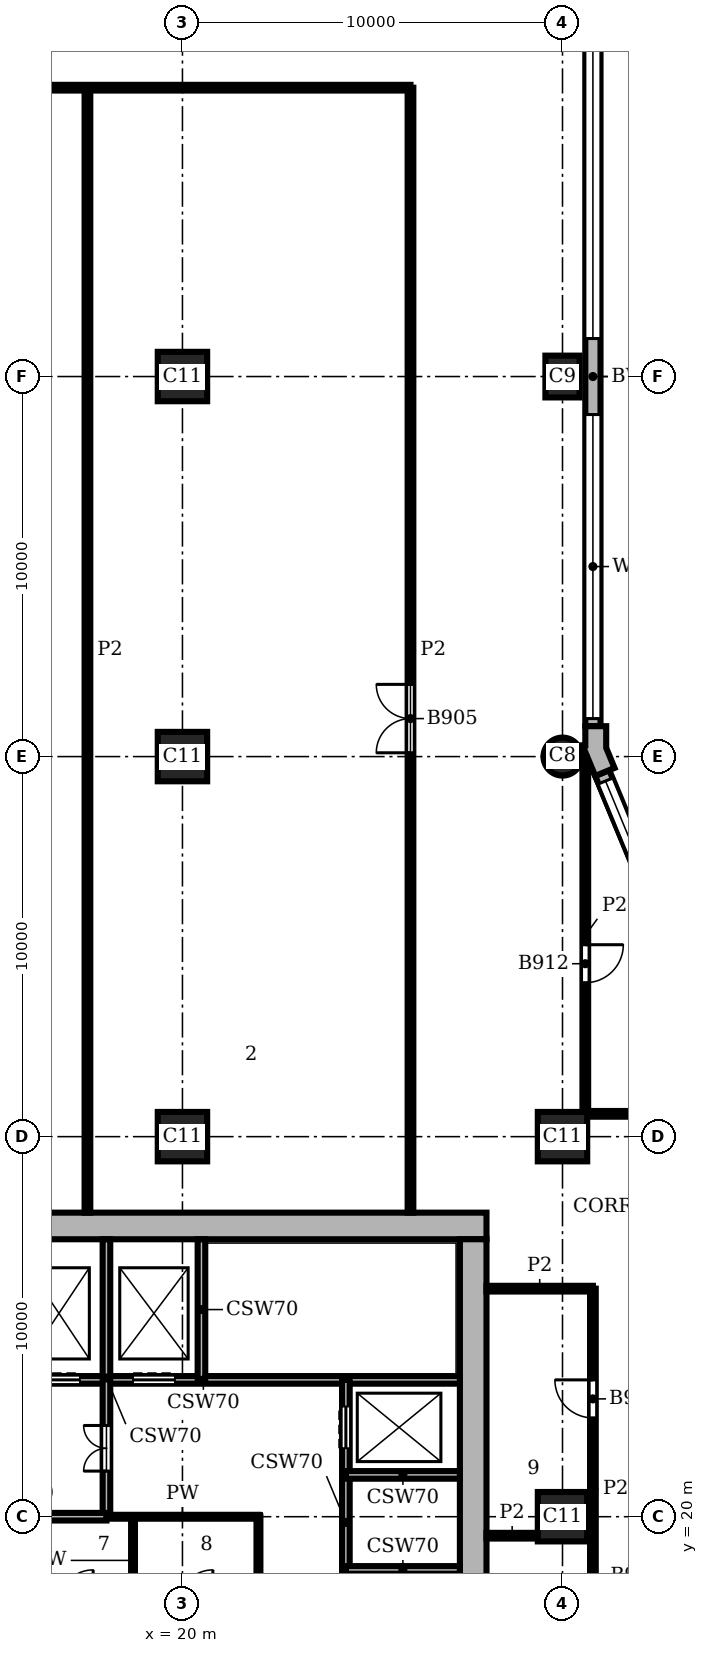
"""IFC4 building model, lengths in metres.
Left out: names, types, materials, properties, quantities, classifications, styles, units other than length and angle.
Written with IfcOpenShell. Run it as: python <this file> out.ifc"""

import sys

from ifc_helpers import new_model, si_unit, direction, frame, frame_2d, origin, origin_2d, place, context, subcontext, project, spatial, polyline, rectangle, circle, outline, extrude, element, fill, save


model = new_model("IFC4")
c1 = context("Model", 3, precision=1e-05, world=origin(), true_north=direction((0.0, 1.0)))
c2 = subcontext(c1, "Body", "Model", "MODEL_VIEW")
j1 = project(units=[si_unit("LENGTHUNIT", "METRE"), si_unit("PLANEANGLEUNIT", "RADIAN")], contexts=[c1])
p1 = place(None, origin())
s1 = spatial("IfcSite", under=j1, at=p1, CompositionType="ELEMENT")
p2 = place(p1, origin())
s2 = spatial("IfcBuilding", under=s1, at=p2, CompositionType="ELEMENT")
p3 = place(p2, frame((0.0, 0.0, 233.1)))
s3 = spatial("IfcBuildingStorey", under=s2, at=p3, CompositionType="ELEMENT", Elevation=233.1)
p4 = place(p3, frame((30.0, 40.0, 0.0), z_axis=(0.0, 0.0, 1.0), x_axis=(1.0, 0.0, 0.0)))
e1 = element("IfcColumn", 1, at=p4, inside=s3, PredefinedType="COLUMN", context=c2, shape_type="SweptSolid", body=[
    extrude(circle(Radius=0.5, at=origin_2d()), origin(), (0.0, 0.0, 1.0), 3.9),
])
p5 = place(p3, frame((30.0, 50.0, 0.0), z_axis=(0.0, 0.0, 1.0), x_axis=(0.0, 1.0, 0.0)))
e2 = element("IfcColumn", 2, at=p5, inside=s3, PredefinedType="COLUMN", context=c2, shape_type="SweptSolid", body=[
    extrude(rectangle(XDim=1.1, YDim=0.9, at=origin_2d()), origin(), (0.0, 0.0, 1.0), 3.9),
])
for number, where, z_axis, x_axis in (
    (3, (20.0, 30.0, 0.0), (0.0, 0.0, 1.0), (1.0, 0.0, 0.0)),
    (4, (20.0, 40.0, 0.0), (0.0, 0.0, 1.0), (1.0, 0.0, 0.0)),
    (5, (20.0, 50.0, 0.0), (0.0, 0.0, 1.0), (1.0, 0.0, 0.0)),
    (6, (30.0, 20.0, 0.0), (0.0, 0.0, 1.0), (1.0, 0.0, 0.0)),
    (7, (30.0, 30.0, 0.0), (0.0, 0.0, 1.0), (1.0, 0.0, 0.0)),
):
    element("IfcColumn", number, at=place(p3, frame(where, z_axis=z_axis, x_axis=x_axis)), inside=s3, PredefinedType="COLUMN", context=c2, shape_type="SweptSolid", body=[
        extrude(rectangle(XDim=1.3, YDim=1.3, at=origin_2d()), origin(), (0.0, 0.0, 1.0), 3.9),
    ])
p6 = place(p3, frame((27.65, 8.7, 0.0), z_axis=(0.0, 0.0, 1.0), x_axis=(0.0, 1.0, 0.0)))
e8 = element("IfcWall", 8, at=p6, inside=s3, PredefinedType="SHEAR", context=c2, shape_type="SweptSolid", body=[
    extrude(rectangle(XDim=18.6, YDim=0.7, at=frame_2d((9.3, 0.0))), origin(), (0.0, 0.0, 1.0), 3.9),
])
p7 = place(p6, frame((4.75, 0.0, 0.0)))
e9 = element("IfcOpeningElement", 9, at=p7, cuts=e8, PredefinedType="OPENING", context=c2, shape_type="SweptSolid", body=[
    extrude(rectangle(XDim=1.6, YDim=2.1, at=frame_2d((0.8, 1.05))), frame((0.0, 0.36, 0.0), z_axis=(0.0, -1.0, 0.0), x_axis=(1.0, 0.0, 0.0)), (0.0, 0.0, 1.0), 0.72),
])
p8 = place(p3, frame((28.0, 27.65, 0.0), z_axis=(0.0, 0.0, 1.0), x_axis=(-1.0, 0.0, 0.0)))
e10 = element("IfcWall", 10, at=p8, inside=s3, PredefinedType="SHEAR", context=c2, shape_type="SweptSolid", body=[
    extrude(rectangle(XDim=20.0, YDim=0.7, at=frame_2d((10.0, 0.0))), origin(), (0.0, 0.0, 1.0), 3.9),
])
p9 = place(p3, origin())
e11 = element("IfcWall", 11, at=p9, inside=s3, PredefinedType="SOLIDWALL", context=c2, shape_type="SweptSolid", body=[
    extrude(outline(polyline([(30.62, 39.995), (30.62, 40.071), (30.861, 39.49), (31.23, 39.644), (31.369, 39.701), (31.15, 40.229), (31.15, 40.8), (31.0, 40.8), (30.6, 40.8), (30.6, 40.295), (30.5, 40.295), (30.5, 39.995), (30.62, 39.995)])), origin(), (0.0, 0.0, 1.0), 3.9),
])
p10 = place(p3, frame((33.362, 33.974, 0.0), z_axis=(0.0, 0.0, 1.0), x_axis=(-0.382655745237, 0.923891000409, 0.0)))
e12 = element("IfcWall", 12, at=p10, inside=s3, PredefinedType="SOLIDWALL", context=c2, shape_type="SweptSolid", body=[
    extrude(rectangle(XDim=6.053, YDim=0.4, at=frame_2d((3.027, 0.0))), origin(), (0.0, 0.0, 1.0), 3.9),
])
p11 = place(p10, frame((0.227, 0.0, 0.9)))
e13 = element("IfcOpeningElement", 13, at=p11, cuts=e12, PredefinedType="OPENING", context=c2, shape_type="SweptSolid", body=[
    extrude(rectangle(XDim=5.6, YDim=2.35, at=frame_2d((2.8, 1.175))), frame((0.0, 0.21, 0.0), z_axis=(0.0, -1.0, 0.0), x_axis=(1.0, 0.0, 0.0)), (0.0, 0.0, 1.0), 0.42),
])
p12 = place(p3, frame((30.8, 40.8, 0.0), z_axis=(0.0, 0.0, 1.0), x_axis=(0.0, 1.0, 0.0)))
e14 = element("IfcWall", 14, at=p12, inside=s3, PredefinedType="SOLIDWALL", context=c2, shape_type="SweptSolid", body=[
    extrude(rectangle(XDim=18.4, YDim=0.4, at=frame_2d((9.2, 0.0))), origin(), (0.0, 0.0, 1.0), 3.9),
])
p13 = place(p12, frame((0.2, 0.0, 0.9)))
e15 = element("IfcOpeningElement", 15, at=p13, cuts=e14, PredefinedType="OPENING", context=c2, shape_type="SweptSolid", body=[
    extrude(rectangle(XDim=8.0, YDim=2.35, at=frame_2d((4.0, 1.175))), frame((0.0, 0.21, 0.0), z_axis=(0.0, -1.0, 0.0), x_axis=(1.0, 0.0, 0.0)), (0.0, 0.0, 1.0), 0.42),
])
p14 = place(p12, frame((10.2, 0.0, 0.9)))
e16 = element("IfcOpeningElement", 16, at=p14, cuts=e14, PredefinedType="OPENING", context=c2, shape_type="SweptSolid", body=[
    extrude(rectangle(XDim=8.0, YDim=2.35, at=frame_2d((4.0, 1.175))), frame((0.0, 0.21, 0.0), z_axis=(0.0, -1.0, 0.0), x_axis=(1.0, 0.0, 0.0)), (0.0, 0.0, 1.0), 0.42),
])
p15 = place(p3, frame((24.3, 18.6, 0.0), z_axis=(0.0, 0.0, 1.0), x_axis=(1.0, 0.0, 0.0)))
e17 = element("IfcWall", 17, at=p15, inside=s3, PredefinedType="SHEAR", context=c2, shape_type="SweptSolid", body=[
    extrude(rectangle(XDim=3.0, YDim=0.2, at=frame_2d((1.5, 0.0))), origin(), (0.0, 0.0, 1.0), 3.45),
])
p16 = place(p3, frame((18.0, 20.0, 0.0), z_axis=(0.0, 0.0, 1.0), x_axis=(1.0, 0.0, 0.0)))
e18 = element("IfcWall", 18, at=p16, inside=s3, PredefinedType="PARTITIONING", context=c2, shape_type="SweptSolid", body=[
    extrude(rectangle(XDim=4.0, YDim=0.1, at=frame_2d((2.0, 0.0))), origin(), (0.0, 0.0, 1.0), 3.45),
])
p17 = place(p3, frame((13.3, 20.0, 0.0), z_axis=(0.0, 0.0, 1.0), x_axis=(1.0, 0.0, 0.0)))
e19 = element("IfcWall", 19, at=p17, inside=s3, PredefinedType="SHEAR", context=c2, shape_type="SweptSolid", body=[
    extrude(rectangle(XDim=4.7, YDim=0.2, at=frame_2d((2.35, 0.0))), origin(), (0.0, 0.0, 1.0), 3.45),
])
p18 = place(p3, frame((24.3, 21.1, 0.0), z_axis=(0.0, 0.0, 1.0), x_axis=(1.0, 0.0, 0.0)))
e20 = element("IfcWall", 20, at=p18, inside=s3, PredefinedType="SHEAR", context=c2, shape_type="SweptSolid", body=[
    extrude(rectangle(XDim=3.0, YDim=0.2, at=frame_2d((1.5, 0.0))), origin(), (0.0, 0.0, 1.0), 3.45),
])
p19 = place(p3, frame((13.8, 23.6, 0.0), z_axis=(0.0, 0.0, 1.0), x_axis=(1.0, 0.0, 0.0)))
e21 = element("IfcWall", 21, at=p19, inside=s3, PredefinedType="SHEAR", context=c2, shape_type="SweptSolid", body=[
    extrude(rectangle(XDim=13.5, YDim=0.2, at=frame_2d((6.75, 0.0))), origin(), (0.0, 0.0, 1.0), 3.45),
])
p20 = place(p19, frame((2.4, 0.0, 0.0)))
e22 = element("IfcOpeningElement", 22, at=p20, cuts=e21, PredefinedType="OPENING", context=c2, shape_type="SweptSolid", body=[
    extrude(rectangle(XDim=1.1, YDim=2.1, at=frame_2d((0.55, 1.05))), frame((0.0, 0.11, 0.0), z_axis=(0.0, -1.0, 0.0), x_axis=(1.0, 0.0, 0.0)), (0.0, 0.0, 1.0), 0.22),
])
p21 = place(p19, frame((4.9, 0.0, 0.0)))
e23 = element("IfcOpeningElement", 23, at=p21, cuts=e21, PredefinedType="OPENING", context=c2, shape_type="SweptSolid", body=[
    extrude(rectangle(XDim=1.1, YDim=2.1, at=frame_2d((0.55, 1.05))), frame((0.0, 0.11, 0.0), z_axis=(0.0, -1.0, 0.0), x_axis=(1.0, 0.0, 0.0)), (0.0, 0.0, 1.0), 0.22),
])
p22 = place(p19, frame((0.2, 0.0, 0.0)))
e24 = element("IfcOpeningElement", 24, at=p22, cuts=e21, PredefinedType="OPENING", context=c2, shape_type="SweptSolid", body=[
    extrude(rectangle(XDim=1.0, YDim=2.1, at=frame_2d((0.5, 1.05))), frame((0.0, 0.11, 0.0), z_axis=(0.0, -1.0, 0.0), x_axis=(1.0, 0.0, 0.0)), (0.0, 0.0, 1.0), 0.22),
])
p23 = place(p3, frame((18.0, 20.0, 0.0), z_axis=(0.0, 0.0, 1.0), x_axis=(0.0, 1.0, 0.0)))
e25 = element("IfcWall", 25, at=p23, inside=s3, PredefinedType="SHEAR", context=c2, shape_type="SweptSolid", body=[
    extrude(rectangle(XDim=7.3, YDim=0.2, at=frame_2d((3.65, 0.0))), origin(), (0.0, 0.0, 1.0), 3.45),
])
p24 = place(p23, frame((1.2, 0.0, 0.0)))
e26 = element("IfcOpeningElement", 26, at=p24, cuts=e25, PredefinedType="OPENING", context=c2, shape_type="SweptSolid", body=[
    extrude(rectangle(XDim=1.2, YDim=2.1, at=frame_2d((0.6, 1.05))), frame((0.0, 0.11, 0.0), z_axis=(0.0, -1.0, 0.0), x_axis=(1.0, 0.0, 0.0)), (0.0, 0.0, 1.0), 0.22),
])
p25 = place(p3, frame((18.7, 17.7, 0.0), z_axis=(0.0, 0.0, 1.0), x_axis=(0.0, 1.0, 0.0)))
e27 = element("IfcWall", 27, at=p25, inside=s3, PredefinedType="PARTITIONING", context=c2, shape_type="SweptSolid", body=[
    extrude(rectangle(XDim=2.3, YDim=0.1, at=frame_2d((1.15, 0.0))), origin(), (0.0, 0.0, 1.0), 3.45),
])
p26 = place(p3, frame((20.5, 23.6, 0.0), z_axis=(0.0, 0.0, 1.0), x_axis=(0.0, 1.0, 0.0)))
e28 = element("IfcWall", 28, at=p26, inside=s3, PredefinedType="SHEAR", context=c2, shape_type="SweptSolid", body=[
    extrude(rectangle(XDim=3.7, YDim=0.2, at=frame_2d((1.85, 0.0))), origin(), (0.0, 0.0, 1.0), 3.45),
])
p27 = place(p3, frame((22.0, 16.2, 0.0), z_axis=(0.0, 0.0, 1.0), x_axis=(0.0, 1.0, 0.0)))
e29 = element("IfcWall", 29, at=p27, inside=s3, PredefinedType="PARTITIONING", context=c2, shape_type="SweptSolid", body=[
    extrude(rectangle(XDim=3.8, YDim=0.1, at=frame_2d((1.9, 0.0))), origin(), (0.0, 0.0, 1.0), 3.45),
])
p28 = place(p27, frame((0.2, 0.0, 0.0)))
e30 = element("IfcOpeningElement", 30, at=p28, cuts=e29, PredefinedType="OPENING", context=c2, shape_type="SweptSolid", body=[
    extrude(rectangle(XDim=1.1, YDim=2.1, at=frame_2d((0.55, 1.05))), frame((0.0, 0.06, 0.0), z_axis=(0.0, -1.0, 0.0), x_axis=(1.0, 0.0, 0.0)), (0.0, 0.0, 1.0), 0.12),
])
p29 = place(p3, frame((24.3, 16.1, 0.0), z_axis=(0.0, 0.0, 1.0), x_axis=(0.0, 1.0, 0.0)))
e31 = element("IfcWall", 31, at=p29, inside=s3, PredefinedType="SHEAR", context=c2, shape_type="SweptSolid", body=[
    extrude(rectangle(XDim=7.5, YDim=0.2, at=frame_2d((3.75, 0.0))), origin(), (0.0, 0.0, 1.0), 3.45),
])
p30 = place(p29, frame((5.7, 0.0, 0.0)))
e32 = element("IfcOpeningElement", 32, at=p30, cuts=e31, PredefinedType="OPENING", context=c2, shape_type="SweptSolid", body=[
    extrude(rectangle(XDim=1.1, YDim=2.1, at=frame_2d((0.55, 1.05))), frame((0.0, 0.11, 0.0), z_axis=(0.0, -1.0, 0.0), x_axis=(1.0, 0.0, 0.0)), (0.0, 0.0, 1.0), 0.22),
])
p31 = place(p3, frame((17.5, 28.0, 0.0), z_axis=(0.0, 0.0, 1.0), x_axis=(0.0, 1.0, 0.0)))
e33 = element("IfcWall", 33, at=p31, inside=s3, PredefinedType="PARTITIONING", context=c2, shape_type="SweptSolid", body=[
    extrude(rectangle(XDim=29.6, YDim=0.15, at=frame_2d((14.8, 0.0))), origin(), (0.0, 0.0, 1.0), 3.45),
])
p32 = place(p3, frame((26.0, 28.0, 0.0), z_axis=(0.0, 0.0, 1.0), x_axis=(0.0, 1.0, 0.0)))
e34 = element("IfcWall", 34, at=p32, inside=s3, PredefinedType="PARTITIONING", context=c2, shape_type="SweptSolid", body=[
    extrude(rectangle(XDim=29.6, YDim=0.15, at=frame_2d((14.8, 0.0))), origin(), (0.0, 0.0, 1.0), 3.45),
])
p33 = place(p32, frame((12.1, 0.0, 0.0)))
e35 = element("IfcOpeningElement", 35, at=p33, cuts=e34, PredefinedType="OPENING", context=c2, shape_type="SweptSolid", body=[
    extrude(rectangle(XDim=1.8, YDim=2.1, at=frame_2d((0.9, 1.05))), frame((0.0, 0.085, 0.0), z_axis=(0.0, -1.0, 0.0), x_axis=(1.0, 0.0, 0.0)), (0.0, 0.0, 1.0), 0.17),
])
p34 = place(p3, frame((30.6, 30.65, 0.0), z_axis=(0.0, 0.0, 1.0), x_axis=(0.0, 1.0, 0.0)))
e36 = element("IfcWall", 36, at=p34, inside=s3, PredefinedType="PARTITIONING", context=c2, shape_type="SweptSolid", body=[
    extrude(rectangle(XDim=9.288, YDim=0.15, at=frame_2d((4.644, 0.0))), origin(), (0.0, 0.0, 1.0), 3.45),
])
p35 = place(p34, frame((3.4, 0.0, 0.0)))
e37 = element("IfcOpeningElement", 37, at=p35, cuts=e36, PredefinedType="OPENING", context=c2, shape_type="SweptSolid", body=[
    extrude(rectangle(XDim=1.0, YDim=2.1, at=frame_2d((0.5, 1.05))), frame((0.0, 0.085, 0.0), z_axis=(0.0, -1.0, 0.0), x_axis=(1.0, 0.0, 0.0)), (0.0, 0.0, 1.0), 0.17),
])
p36 = place(p3, frame((30.8, 15.45, 0.0), z_axis=(0.0, 0.0, 1.0), x_axis=(0.0, 1.0, 0.0)))
e38 = element("IfcWall", 38, at=p36, inside=s3, PredefinedType="PARTITIONING", context=c2, shape_type="SweptSolid", body=[
    extrude(rectangle(XDim=10.55, YDim=0.15, at=frame_2d((5.275, 0.0))), origin(), (0.0, 0.0, 1.0), 3.45),
])
p37 = place(p36, frame((7.15, 0.0, 0.0)))
e39 = element("IfcOpeningElement", 39, at=p37, cuts=e38, PredefinedType="OPENING", context=c2, shape_type="SweptSolid", body=[
    extrude(rectangle(XDim=1.0, YDim=2.1, at=frame_2d((0.5, 1.05))), frame((0.0, 0.085, 0.0), z_axis=(0.0, -1.0, 0.0), x_axis=(1.0, 0.0, 0.0)), (0.0, 0.0, 1.0), 0.17),
])
p38 = place(p36, frame((1.35, 0.0, 0.0)))
e40 = element("IfcOpeningElement", 40, at=p38, cuts=e38, PredefinedType="OPENING", context=c2, shape_type="SweptSolid", body=[
    extrude(rectangle(XDim=1.0, YDim=2.1, at=frame_2d((0.5, 1.05))), frame((0.0, 0.085, 0.0), z_axis=(0.0, -1.0, 0.0), x_axis=(1.0, 0.0, 0.0)), (0.0, 0.0, 1.0), 0.17),
])
p39 = place(p3, frame((28.0, 19.5, 0.0), z_axis=(0.0, 0.0, 1.0), x_axis=(1.0, 0.0, 0.0)))
e41 = element("IfcWall", 41, at=p39, inside=s3, PredefinedType="PARTITIONING", context=c2, shape_type="SweptSolid", body=[
    extrude(rectangle(XDim=1.35, YDim=0.15, at=frame_2d((0.675, 0.0))), origin(), (0.0, 0.0, 1.0), 3.45),
])
p40 = place(p3, frame((28.0, 26.0, 0.0), z_axis=(0.0, 0.0, 1.0), x_axis=(1.0, 0.0, 0.0)))
e42 = element("IfcWall", 42, at=p40, inside=s3, PredefinedType="PARTITIONING", context=c2, shape_type="SweptSolid", body=[
    extrude(rectangle(XDim=2.8, YDim=0.15, at=frame_2d((1.4, 0.0))), origin(), (0.0, 0.0, 1.0), 3.45),
])
p41 = place(p3, frame((30.65, 30.6, 0.0), z_axis=(0.0, 0.0, 1.0), x_axis=(1.0, 0.0, 0.0)))
e43 = element("IfcWall", 43, at=p41, inside=s3, PredefinedType="PARTITIONING", context=c2, shape_type="SweptSolid", body=[
    extrude(rectangle(XDim=9.288, YDim=0.15, at=frame_2d((4.644, 0.0))), origin(), (0.0, 0.0, 1.0), 3.45),
])
p42 = place(p3, frame((5.5, 57.6, 0.0), z_axis=(0.0, 0.0, 1.0), x_axis=(1.0, 0.0, 0.0)))
e44 = element("IfcWall", 44, at=p42, inside=s3, PredefinedType="PARTITIONING", context=c2, shape_type="SweptSolid", body=[
    extrude(rectangle(XDim=20.5, YDim=0.15, at=frame_2d((10.25, 0.0))), origin(), (0.0, 0.0, 1.0), 3.45),
])
p43 = place(p42, frame((8.1, 0.0, 0.0)))
e45 = element("IfcOpeningElement", 45, at=p43, cuts=e44, PredefinedType="OPENING", context=c2, shape_type="SweptSolid", body=[
    extrude(rectangle(XDim=1.8, YDim=2.1, at=frame_2d((0.9, 1.05))), frame((0.0, 0.085, 0.0), z_axis=(0.0, -1.0, 0.0), x_axis=(1.0, 0.0, 0.0)), (0.0, 0.0, 1.0), 0.17),
])
p44 = place(p11, origin())
e46 = element("IfcWindow", 46, at=p44, inside=s3, PartitioningType="SINGLE_PANEL", PredefinedType="WINDOW", context=c2, shape_type="SweptSolid", body=[
    extrude(rectangle(XDim=5.6, YDim=2.35, at=frame_2d((2.8, 1.175))), frame((0.0, 0.16, 0.0), z_axis=(0.0, -1.0, 0.0), x_axis=(1.0, 0.0, 0.0)), (0.0, 0.0, 1.0), 0.06),
])
fill(e13, e46)
p45 = place(p13, origin())
e47 = element("IfcWindow", 47, at=p45, inside=s3, PartitioningType="SINGLE_PANEL", PredefinedType="WINDOW", context=c2, shape_type="SweptSolid", body=[
    extrude(rectangle(XDim=8.0, YDim=2.35, at=frame_2d((4.0, 1.175))), frame((0.0, 0.16, 0.0), z_axis=(0.0, -1.0, 0.0), x_axis=(1.0, 0.0, 0.0)), (0.0, 0.0, 1.0), 0.06),
])
fill(e15, e47)
p46 = place(p14, origin())
e48 = element("IfcWindow", 48, at=p46, inside=s3, PartitioningType="SINGLE_PANEL", PredefinedType="WINDOW", context=c2, shape_type="SweptSolid", body=[
    extrude(rectangle(XDim=8.0, YDim=2.35, at=frame_2d((4.0, 1.175))), frame((0.0, 0.16, 0.0), z_axis=(0.0, -1.0, 0.0), x_axis=(1.0, 0.0, 0.0)), (0.0, 0.0, 1.0), 0.06),
])
fill(e16, e48)
p47 = place(p30, origin())
e49 = element("IfcDoor", 49, at=p47, inside=s3, OperationType="DOUBLE_DOOR_SLIDING", PredefinedType="DOOR", context=c2, shape_type="SweptSolid", body=[
    extrude(rectangle(XDim=1.1, YDim=2.1, at=frame_2d((0.55, 1.05))), frame((0.0, 0.025, 0.0), z_axis=(0.0, -1.0, 0.0), x_axis=(1.0, 0.0, 0.0)), (0.0, 0.0, 1.0), 0.05),
])
fill(e32, e49)
p48 = place(p20, origin())
e50 = element("IfcDoor", 50, at=p48, inside=s3, OperationType="DOUBLE_DOOR_SLIDING", PredefinedType="DOOR", context=c2, shape_type="SweptSolid", body=[
    extrude(rectangle(XDim=1.1, YDim=2.1, at=frame_2d((0.55, 1.05))), frame((0.0, 0.025, 0.0), z_axis=(0.0, -1.0, 0.0), x_axis=(1.0, 0.0, 0.0)), (0.0, 0.0, 1.0), 0.05),
])
fill(e22, e50)
p49 = place(p21, origin())
e51 = element("IfcDoor", 51, at=p49, inside=s3, OperationType="DOUBLE_DOOR_SLIDING", PredefinedType="DOOR", context=c2, shape_type="SweptSolid", body=[
    extrude(rectangle(XDim=1.1, YDim=2.1, at=frame_2d((0.55, 1.05))), frame((0.0, 0.025, 0.0), z_axis=(0.0, -1.0, 0.0), x_axis=(1.0, 0.0, 0.0)), (0.0, 0.0, 1.0), 0.05),
])
fill(e23, e51)
p50 = place(p24, origin())
e52 = element("IfcDoor", 52, at=p50, inside=s3, OperationType="DOUBLE_DOOR_SINGLE_SWING", PredefinedType="DOOR", context=c2, shape_type="SweptSolid", body=[
    extrude(rectangle(XDim=1.2, YDim=2.1, at=frame_2d((0.6, 1.05))), frame((0.0, 0.025, 0.0), z_axis=(0.0, -1.0, 0.0), x_axis=(1.0, 0.0, 0.0)), (0.0, 0.0, 1.0), 0.05),
])
fill(e26, e52)
p51 = place(p33, origin())
e53 = element("IfcDoor", 53, at=p51, inside=s3, OperationType="DOUBLE_DOOR_SINGLE_SWING", PredefinedType="DOOR", context=c2, shape_type="SweptSolid", body=[
    extrude(rectangle(XDim=1.8, YDim=2.1, at=frame_2d((0.9, 1.05))), frame((0.0, 0.025, 0.0), z_axis=(0.0, -1.0, 0.0), x_axis=(1.0, 0.0, 0.0)), (0.0, 0.0, 1.0), 0.05),
])
fill(e35, e53)
p52 = place(p35, frame((1.0, 0.0, 0.0), z_axis=(0.0, 0.0, 1.0), x_axis=(-1.0, 0.0, 0.0)))
e54 = element("IfcDoor", 54, at=p52, inside=s3, OperationType="SINGLE_SWING_LEFT", PredefinedType="DOOR", context=c2, shape_type="SweptSolid", body=[
    extrude(rectangle(XDim=1.0, YDim=2.1, at=frame_2d((0.5, 1.05))), frame((0.0, 0.025, 0.0), z_axis=(0.0, -1.0, 0.0), x_axis=(1.0, 0.0, 0.0)), (0.0, 0.0, 1.0), 0.05),
])
fill(e37, e54)
p53 = place(p37, origin())
e55 = element("IfcDoor", 55, at=p53, inside=s3, OperationType="SINGLE_SWING_RIGHT", PredefinedType="DOOR", context=c2, shape_type="SweptSolid", body=[
    extrude(rectangle(XDim=1.0, YDim=2.1, at=frame_2d((0.5, 1.05))), frame((0.0, 0.025, 0.0), z_axis=(0.0, -1.0, 0.0), x_axis=(1.0, 0.0, 0.0)), (0.0, 0.0, 1.0), 0.05),
])
fill(e39, e55)
save(model, sys.argv[1])
